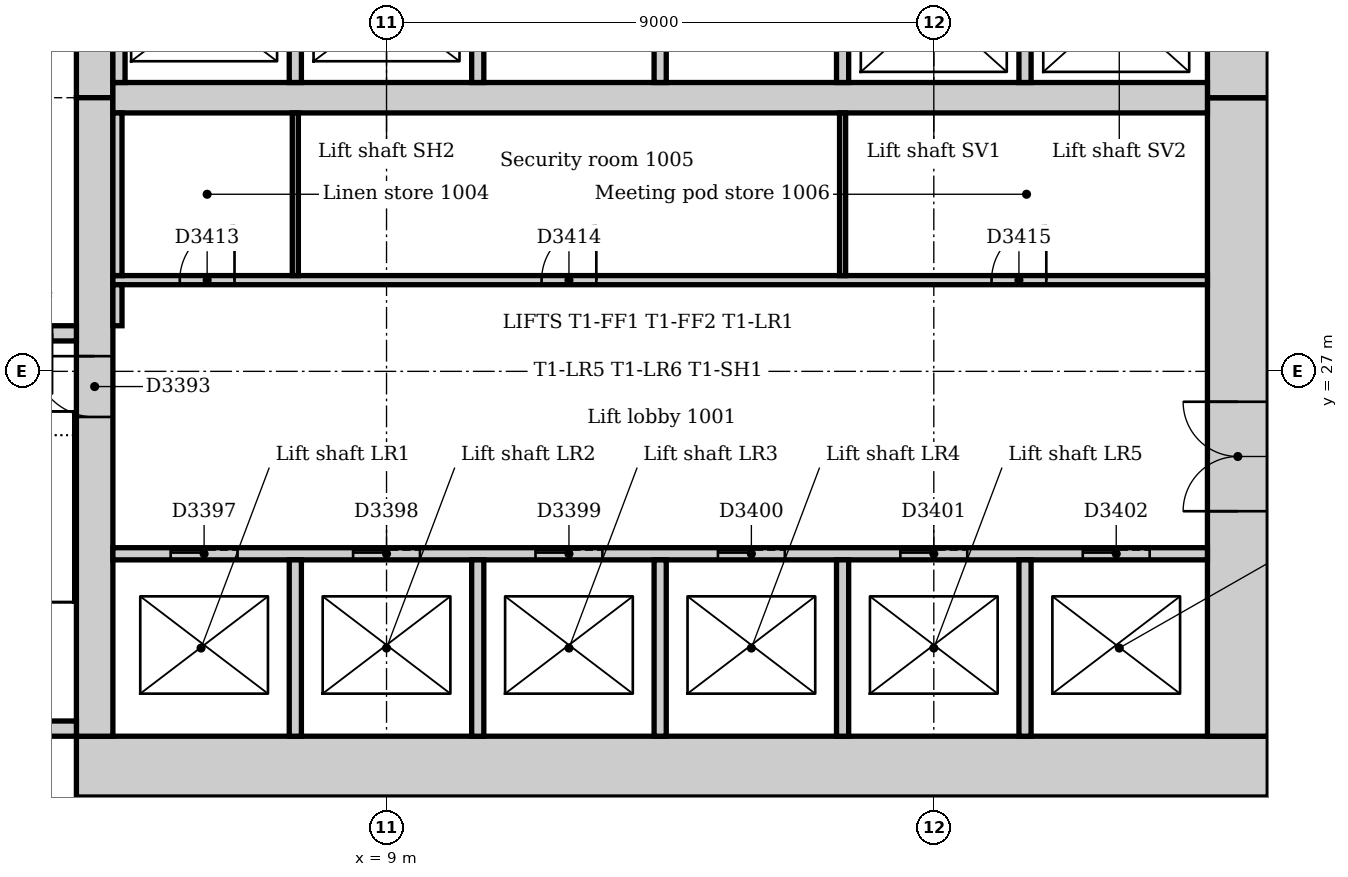
"""IFC4 building model, lengths in metres.
Left out: names, types, materials, properties, quantities, classifications, styles, units other than length and angle.
Written with IfcOpenShell. Run it as: python <this file> out.ifc"""

import sys

from ifc_helpers import new_model, si_unit, direction, frame, frame_2d, origin, place, context, subcontext, project, spatial, rectangle, extrude, element, fill, save


model = new_model("IFC4")
c1 = context("Model", 3, precision=1e-05, world=origin(), true_north=direction((0.0, 1.0)))
c2 = subcontext(c1, "Body", "Model", "MODEL_VIEW")
j1 = project(units=[si_unit("LENGTHUNIT", "METRE"), si_unit("PLANEANGLEUNIT", "RADIAN")], contexts=[c1])
p1 = place(None, origin())
s1 = spatial("IfcSite", under=j1, at=p1, CompositionType="ELEMENT")
p2 = place(p1, origin())
s2 = spatial("IfcBuilding", under=s1, at=p2, CompositionType="ELEMENT")
p3 = place(p2, frame((0.0, 0.0, 46.0)))
s3 = spatial("IfcBuildingStorey", under=s2, at=p3, CompositionType="ELEMENT", Elevation=46.0)
p4 = place(p3, frame((3.9, 20.5, 0.0), z_axis=(0.0, 0.0, 1.0), x_axis=(1.0, 0.0, 0.0)))
e1 = element("IfcWall", 1, at=p4, inside=s3, PredefinedType="SOLIDWALL", context=c2, shape_type="SweptSolid", body=[
    extrude(rectangle(XDim=19.6, YDim=1.0, at=frame_2d((9.8, 0.0))), origin(), (0.0, 0.0, 1.0), 5.0),
])
p5 = place(p3, frame((23.0, 21.0, 0.0), z_axis=(0.0, 0.0, 1.0), x_axis=(0.0, 1.0, 0.0)))
e2 = element("IfcWall", 2, at=p5, inside=s3, PredefinedType="SOLIDWALL", context=c2, shape_type="SweptSolid", body=[
    extrude(rectangle(XDim=10.5, YDim=1.0, at=frame_2d((5.25, 0.0))), origin(), (0.0, 0.0, 1.0), 5.0),
])
p6 = place(p5, frame((3.7, 0.0, 0.0)))
e3 = element("IfcOpeningElement", 3, at=p6, cuts=e2, PredefinedType="OPENING", context=c2, shape_type="SweptSolid", body=[
    extrude(rectangle(XDim=1.8, YDim=2.1, at=frame_2d((0.9, 1.05))), frame((0.0, 0.51, 0.0), z_axis=(0.0, -1.0, 0.0), x_axis=(1.0, 0.0, 0.0)), (0.0, 0.0, 1.0), 1.02),
])
p7 = place(p3, frame((23.0, 31.5, 0.0), z_axis=(0.0, 0.0, 1.0), x_axis=(0.0, 1.0, 0.0)))
e4 = element("IfcWall", 4, at=p7, inside=s3, PredefinedType="SOLIDWALL", context=c2, shape_type="SweptSolid", body=[
    extrude(rectangle(XDim=10.5, YDim=1.0, at=frame_2d((5.25, 0.0))), origin(), (0.0, 0.0, 1.0), 5.0),
])
p8 = place(p7, frame((3.15, 0.0, 0.0)))
e5 = element("IfcOpeningElement", 5, at=p8, cuts=e4, PredefinedType="OPENING", context=c2, shape_type="SweptSolid", body=[
    extrude(rectangle(XDim=1.0, YDim=2.1, at=frame_2d((0.5, 1.05))), frame((0.0, 0.51, 0.0), z_axis=(0.0, -1.0, 0.0), x_axis=(1.0, 0.0, 0.0)), (0.0, 0.0, 1.0), 1.02),
])
p9 = place(p7, frame((5.2, 0.0, 0.0)))
e6 = element("IfcOpeningElement", 6, at=p9, cuts=e4, PredefinedType="OPENING", context=c2, shape_type="SweptSolid", body=[
    extrude(rectangle(XDim=1.0, YDim=2.1, at=frame_2d((0.5, 1.05))), frame((0.0, 0.51, 0.0), z_axis=(0.0, -1.0, 0.0), x_axis=(1.0, 0.0, 0.0)), (0.0, 0.0, 1.0), 1.02),
])
p10 = place(p3, frame((4.2, 42.0, 0.0), z_axis=(0.0, 0.0, 1.0), x_axis=(0.0, -1.0, 0.0)))
e7 = element("IfcWall", 7, at=p10, inside=s3, PredefinedType="SOLIDWALL", context=c2, shape_type="SweptSolid", body=[
    extrude(rectangle(XDim=10.5, YDim=0.6, at=frame_2d((5.25, 0.0))), origin(), (0.0, 0.0, 1.0), 5.0),
])
p11 = place(p10, frame((5.3, 0.0, 0.0)))
e8 = element("IfcOpeningElement", 8, at=p11, cuts=e7, PredefinedType="OPENING", context=c2, shape_type="SweptSolid", body=[
    extrude(rectangle(XDim=1.0, YDim=2.1, at=frame_2d((0.5, 1.05))), frame((0.0, 0.31, 0.0), z_axis=(0.0, -1.0, 0.0), x_axis=(1.0, 0.0, 0.0)), (0.0, 0.0, 1.0), 0.62),
])
p12 = place(p3, frame((4.2, 31.5, 0.0), z_axis=(0.0, 0.0, 1.0), x_axis=(0.0, -1.0, 0.0)))
e9 = element("IfcWall", 9, at=p12, inside=s3, PredefinedType="SOLIDWALL", context=c2, shape_type="SweptSolid", body=[
    extrude(rectangle(XDim=10.5, YDim=0.6, at=frame_2d((5.25, 0.0))), origin(), (0.0, 0.0, 1.0), 5.0),
])
p13 = place(p12, frame((4.25, 0.0, 0.0)))
e10 = element("IfcOpeningElement", 10, at=p13, cuts=e9, PredefinedType="OPENING", context=c2, shape_type="SweptSolid", body=[
    extrude(rectangle(XDim=1.0, YDim=2.1, at=frame_2d((0.5, 1.05))), frame((0.0, 0.31, 0.0), z_axis=(0.0, -1.0, 0.0), x_axis=(1.0, 0.0, 0.0)), (0.0, 0.0, 1.0), 0.62),
])
p14 = place(p3, frame((4.5, 31.5, 0.0), z_axis=(0.0, 0.0, 1.0), x_axis=(1.0, 0.0, 0.0)))
e11 = element("IfcWall", 11, at=p14, inside=s3, PredefinedType="SOLIDWALL", context=c2, shape_type="SweptSolid", body=[
    extrude(rectangle(XDim=18.0, YDim=0.5, at=frame_2d((9.0, 0.0))), origin(), (0.0, 0.0, 1.0), 5.0),
])
p15 = place(p3, frame((0.36, 21.125, 0.0), z_axis=(0.0, 0.0, 1.0), x_axis=(1.0, 0.0, 0.0)))
e12 = element("IfcWall", 12, at=p15, inside=s3, PredefinedType="SOLIDWALL", context=c2, shape_type="SweptSolid", body=[
    extrude(rectangle(XDim=3.54, YDim=0.25, at=frame_2d((1.77, 0.0))), origin(), (0.0, 0.0, 1.0), 5.0),
])
p16 = place(p3, frame((3.9, 27.625, 0.0), z_axis=(0.0, 0.0, 1.0), x_axis=(-1.0, 0.0, 0.0)))
e13 = element("IfcWall", 13, at=p16, inside=s3, PredefinedType="SOLIDWALL", context=c2, shape_type="SweptSolid", body=[
    extrude(rectangle(XDim=3.54, YDim=0.25, at=frame_2d((1.77, 0.0))), origin(), (0.0, 0.0, 1.0), 5.0),
])
p17 = place(p16, frame((0.4, 0.0, 0.0)))
e14 = element("IfcOpeningElement", 14, at=p17, cuts=e13, PredefinedType="OPENING", context=c2, shape_type="SweptSolid", body=[
    extrude(rectangle(XDim=1.0, YDim=2.1, at=frame_2d((0.5, 1.05))), frame((0.0, 0.135, 0.0), z_axis=(0.0, -1.0, 0.0), x_axis=(1.0, 0.0, 0.0)), (0.0, 0.0, 1.0), 0.27),
])
p18 = place(p3, frame((4.5, 24.0, 0.0), z_axis=(0.0, 0.0, 1.0), x_axis=(1.0, 0.0, 0.0)))
e15 = element("IfcWall", 15, at=p18, inside=s3, PredefinedType="PARTITIONING", context=c2, shape_type="SweptSolid", body=[
    extrude(rectangle(XDim=18.0, YDim=0.2, at=frame_2d((9.0, 0.0))), origin(), (0.0, 0.0, 1.0), 4.85),
])
p19 = place(p18, frame((0.95, 0.0, 0.0)))
e16 = element("IfcOpeningElement", 16, at=p19, cuts=e15, PredefinedType="OPENING", context=c2, shape_type="SweptSolid", body=[
    extrude(rectangle(XDim=1.1, YDim=2.1, at=frame_2d((0.55, 1.05))), frame((0.0, 0.11, 0.0), z_axis=(0.0, -1.0, 0.0), x_axis=(1.0, 0.0, 0.0)), (0.0, 0.0, 1.0), 0.22),
])
p20 = place(p18, frame((3.95, 0.0, 0.0)))
e17 = element("IfcOpeningElement", 17, at=p20, cuts=e15, PredefinedType="OPENING", context=c2, shape_type="SweptSolid", body=[
    extrude(rectangle(XDim=1.1, YDim=2.1, at=frame_2d((0.55, 1.05))), frame((0.0, 0.11, 0.0), z_axis=(0.0, -1.0, 0.0), x_axis=(1.0, 0.0, 0.0)), (0.0, 0.0, 1.0), 0.22),
])
p21 = place(p18, frame((6.95, 0.0, 0.0)))
e18 = element("IfcOpeningElement", 18, at=p21, cuts=e15, PredefinedType="OPENING", context=c2, shape_type="SweptSolid", body=[
    extrude(rectangle(XDim=1.1, YDim=2.1, at=frame_2d((0.55, 1.05))), frame((0.0, 0.11, 0.0), z_axis=(0.0, -1.0, 0.0), x_axis=(1.0, 0.0, 0.0)), (0.0, 0.0, 1.0), 0.22),
])
p22 = place(p18, frame((9.95, 0.0, 0.0)))
e19 = element("IfcOpeningElement", 19, at=p22, cuts=e15, PredefinedType="OPENING", context=c2, shape_type="SweptSolid", body=[
    extrude(rectangle(XDim=1.1, YDim=2.1, at=frame_2d((0.55, 1.05))), frame((0.0, 0.11, 0.0), z_axis=(0.0, -1.0, 0.0), x_axis=(1.0, 0.0, 0.0)), (0.0, 0.0, 1.0), 0.22),
])
p23 = place(p18, frame((12.95, 0.0, 0.0)))
e20 = element("IfcOpeningElement", 20, at=p23, cuts=e15, PredefinedType="OPENING", context=c2, shape_type="SweptSolid", body=[
    extrude(rectangle(XDim=1.1, YDim=2.1, at=frame_2d((0.55, 1.05))), frame((0.0, 0.11, 0.0), z_axis=(0.0, -1.0, 0.0), x_axis=(1.0, 0.0, 0.0)), (0.0, 0.0, 1.0), 0.22),
])
p24 = place(p18, frame((15.95, 0.0, 0.0)))
e21 = element("IfcOpeningElement", 21, at=p24, cuts=e15, PredefinedType="OPENING", context=c2, shape_type="SweptSolid", body=[
    extrude(rectangle(XDim=1.1, YDim=2.1, at=frame_2d((0.55, 1.05))), frame((0.0, 0.11, 0.0), z_axis=(0.0, -1.0, 0.0), x_axis=(1.0, 0.0, 0.0)), (0.0, 0.0, 1.0), 0.22),
])
p25 = place(p3, frame((4.6, 31.75, 0.0), z_axis=(0.0, 0.0, 1.0), x_axis=(0.0, 1.0, 0.0)))
e22 = element("IfcWall", 22, at=p25, inside=s3, PredefinedType="PARTITIONING", context=c2, shape_type="SweptSolid", body=[
    extrude(rectangle(XDim=2.65, YDim=0.2, at=frame_2d((1.325, 0.0))), origin(), (0.0, 0.0, 1.0), 4.85),
])
p26 = place(p3, frame((7.5, 21.0, 0.0), z_axis=(0.0, 0.0, 1.0), x_axis=(0.0, 1.0, 0.0)))
e23 = element("IfcWall", 23, at=p26, inside=s3, PredefinedType="PARTITIONING", context=c2, shape_type="SweptSolid", body=[
    extrude(rectangle(XDim=2.9, YDim=0.2, at=frame_2d((1.45, 0.0))), origin(), (0.0, 0.0, 1.0), 4.85),
])
p27 = place(p3, frame((7.5, 31.75, 0.0), z_axis=(0.0, 0.0, 1.0), x_axis=(0.0, 1.0, 0.0)))
e24 = element("IfcWall", 24, at=p27, inside=s3, PredefinedType="PARTITIONING", context=c2, shape_type="SweptSolid", body=[
    extrude(rectangle(XDim=2.65, YDim=0.2, at=frame_2d((1.325, 0.0))), origin(), (0.0, 0.0, 1.0), 4.85),
])
p28 = place(p3, frame((10.5, 21.0, 0.0), z_axis=(0.0, 0.0, 1.0), x_axis=(0.0, 1.0, 0.0)))
e25 = element("IfcWall", 25, at=p28, inside=s3, PredefinedType="PARTITIONING", context=c2, shape_type="SweptSolid", body=[
    extrude(rectangle(XDim=2.9, YDim=0.2, at=frame_2d((1.45, 0.0))), origin(), (0.0, 0.0, 1.0), 4.85),
])
p29 = place(p3, frame((10.5, 31.75, 0.0), z_axis=(0.0, 0.0, 1.0), x_axis=(0.0, 1.0, 0.0)))
e26 = element("IfcWall", 26, at=p29, inside=s3, PredefinedType="PARTITIONING", context=c2, shape_type="SweptSolid", body=[
    extrude(rectangle(XDim=2.65, YDim=0.2, at=frame_2d((1.325, 0.0))), origin(), (0.0, 0.0, 1.0), 4.85),
])
p30 = place(p3, frame((13.5, 21.0, 0.0), z_axis=(0.0, 0.0, 1.0), x_axis=(0.0, 1.0, 0.0)))
e27 = element("IfcWall", 27, at=p30, inside=s3, PredefinedType="PARTITIONING", context=c2, shape_type="SweptSolid", body=[
    extrude(rectangle(XDim=2.9, YDim=0.2, at=frame_2d((1.45, 0.0))), origin(), (0.0, 0.0, 1.0), 4.85),
])
p31 = place(p3, frame((13.5, 31.75, 0.0), z_axis=(0.0, 0.0, 1.0), x_axis=(0.0, 1.0, 0.0)))
e28 = element("IfcWall", 28, at=p31, inside=s3, PredefinedType="PARTITIONING", context=c2, shape_type="SweptSolid", body=[
    extrude(rectangle(XDim=2.65, YDim=0.2, at=frame_2d((1.325, 0.0))), origin(), (0.0, 0.0, 1.0), 4.85),
])
p32 = place(p3, frame((16.5, 21.0, 0.0), z_axis=(0.0, 0.0, 1.0), x_axis=(0.0, 1.0, 0.0)))
e29 = element("IfcWall", 29, at=p32, inside=s3, PredefinedType="PARTITIONING", context=c2, shape_type="SweptSolid", body=[
    extrude(rectangle(XDim=2.9, YDim=0.2, at=frame_2d((1.45, 0.0))), origin(), (0.0, 0.0, 1.0), 4.85),
])
p33 = place(p3, frame((16.5, 31.75, 0.0), z_axis=(0.0, 0.0, 1.0), x_axis=(0.0, 1.0, 0.0)))
e30 = element("IfcWall", 30, at=p33, inside=s3, PredefinedType="PARTITIONING", context=c2, shape_type="SweptSolid", body=[
    extrude(rectangle(XDim=2.65, YDim=0.2, at=frame_2d((1.325, 0.0))), origin(), (0.0, 0.0, 1.0), 4.85),
])
p34 = place(p3, frame((19.5, 21.0, 0.0), z_axis=(0.0, 0.0, 1.0), x_axis=(0.0, 1.0, 0.0)))
e31 = element("IfcWall", 31, at=p34, inside=s3, PredefinedType="PARTITIONING", context=c2, shape_type="SweptSolid", body=[
    extrude(rectangle(XDim=2.9, YDim=0.2, at=frame_2d((1.45, 0.0))), origin(), (0.0, 0.0, 1.0), 4.85),
])
p35 = place(p3, frame((19.5, 31.75, 0.0), z_axis=(0.0, 0.0, 1.0), x_axis=(0.0, 1.0, 0.0)))
e32 = element("IfcWall", 32, at=p35, inside=s3, PredefinedType="PARTITIONING", context=c2, shape_type="SweptSolid", body=[
    extrude(rectangle(XDim=2.65, YDim=0.2, at=frame_2d((1.325, 0.0))), origin(), (0.0, 0.0, 1.0), 4.85),
])
p36 = place(p3, frame((4.5, 28.5, 0.0), z_axis=(0.0, 0.0, 1.0), x_axis=(1.0, 0.0, 0.0)))
e33 = element("IfcWall", 33, at=p36, inside=s3, PredefinedType="PARTITIONING", context=c2, shape_type="SweptSolid", body=[
    extrude(rectangle(XDim=18.0, YDim=0.15, at=frame_2d((9.0, 0.0))), origin(), (0.0, 0.0, 1.0), 4.85),
])
p37 = place(p36, frame((1.1, 0.0, 0.0)))
e34 = element("IfcOpeningElement", 34, at=p37, cuts=e33, PredefinedType="OPENING", context=c2, shape_type="SweptSolid", body=[
    extrude(rectangle(XDim=0.9, YDim=2.1, at=frame_2d((0.45, 1.05))), frame((0.0, 0.085, 0.0), z_axis=(0.0, -1.0, 0.0), x_axis=(1.0, 0.0, 0.0)), (0.0, 0.0, 1.0), 0.17),
])
p38 = place(p36, frame((7.05, 0.0, 0.0)))
e35 = element("IfcOpeningElement", 35, at=p38, cuts=e33, PredefinedType="OPENING", context=c2, shape_type="SweptSolid", body=[
    extrude(rectangle(XDim=0.9, YDim=2.1, at=frame_2d((0.45, 1.05))), frame((0.0, 0.085, 0.0), z_axis=(0.0, -1.0, 0.0), x_axis=(1.0, 0.0, 0.0)), (0.0, 0.0, 1.0), 0.17),
])
p39 = place(p36, frame((14.45, 0.0, 0.0)))
e36 = element("IfcOpeningElement", 36, at=p39, cuts=e33, PredefinedType="OPENING", context=c2, shape_type="SweptSolid", body=[
    extrude(rectangle(XDim=0.9, YDim=2.1, at=frame_2d((0.45, 1.05))), frame((0.0, 0.085, 0.0), z_axis=(0.0, -1.0, 0.0), x_axis=(1.0, 0.0, 0.0)), (0.0, 0.0, 1.0), 0.17),
])
p40 = place(p3, frame((4.575, 27.75, 0.0), z_axis=(0.0, 0.0, 1.0), x_axis=(0.0, 1.0, 0.0)))
e37 = element("IfcWall", 37, at=p40, inside=s3, PredefinedType="PARTITIONING", context=c2, shape_type="SweptSolid", body=[
    extrude(rectangle(XDim=0.675, YDim=0.15, at=frame_2d((0.338, 0.0))), origin(), (0.0, 0.0, 1.0), 4.85),
])
p41 = place(p3, frame((4.575, 28.575, 0.0), z_axis=(0.0, 0.0, 1.0), x_axis=(0.0, 1.0, 0.0)))
e38 = element("IfcWall", 38, at=p41, inside=s3, PredefinedType="PARTITIONING", context=c2, shape_type="SweptSolid", body=[
    extrude(rectangle(XDim=2.675, YDim=0.15, at=frame_2d((1.337, 0.0))), origin(), (0.0, 0.0, 1.0), 4.85),
])
for number, where, z_axis, x_axis in (
    (39, (7.5, 28.575, 0.0), (0.0, 0.0, 1.0), (0.0, 1.0, 0.0)),
    (40, (16.5, 28.575, 0.0), (0.0, 0.0, 1.0), (0.0, 1.0, 0.0)),
):
    element("IfcWall", number, at=place(p3, frame(where, z_axis=z_axis, x_axis=x_axis)), inside=s3, PredefinedType="PARTITIONING", context=c2, shape_type="SweptSolid", body=[
        extrude(rectangle(XDim=2.675, YDim=0.1, at=frame_2d((1.337, 0.0))), origin(), (0.0, 0.0, 1.0), 4.85),
    ])
p42 = place(p13, frame((1.0, 0.0, 0.0), z_axis=(0.0, 0.0, 1.0), x_axis=(-1.0, 0.0, 0.0)))
e41 = element("IfcDoor", 41, at=p42, inside=s3, OperationType="SINGLE_SWING_RIGHT", PredefinedType="DOOR", context=c2, shape_type="SweptSolid", body=[
    extrude(rectangle(XDim=1.0, YDim=2.1, at=frame_2d((0.5, 1.05))), frame((0.0, 0.025, 0.0), z_axis=(0.0, -1.0, 0.0), x_axis=(1.0, 0.0, 0.0)), (0.0, 0.0, 1.0), 0.05),
])
fill(e10, e41)
p43 = place(p19, origin())
e42 = element("IfcDoor", 42, at=p43, inside=s3, OperationType="SLIDING_TO_LEFT", PredefinedType="DOOR", context=c2, shape_type="SweptSolid", body=[
    extrude(rectangle(XDim=1.1, YDim=2.1, at=frame_2d((0.55, 1.05))), frame((0.0, 0.025, 0.0), z_axis=(0.0, -1.0, 0.0), x_axis=(1.0, 0.0, 0.0)), (0.0, 0.0, 1.0), 0.05),
])
fill(e16, e42)
p44 = place(p20, origin())
e43 = element("IfcDoor", 43, at=p44, inside=s3, OperationType="SLIDING_TO_LEFT", PredefinedType="DOOR", context=c2, shape_type="SweptSolid", body=[
    extrude(rectangle(XDim=1.1, YDim=2.1, at=frame_2d((0.55, 1.05))), frame((0.0, 0.025, 0.0), z_axis=(0.0, -1.0, 0.0), x_axis=(1.0, 0.0, 0.0)), (0.0, 0.0, 1.0), 0.05),
])
fill(e17, e43)
p45 = place(p21, origin())
e44 = element("IfcDoor", 44, at=p45, inside=s3, OperationType="SLIDING_TO_LEFT", PredefinedType="DOOR", context=c2, shape_type="SweptSolid", body=[
    extrude(rectangle(XDim=1.1, YDim=2.1, at=frame_2d((0.55, 1.05))), frame((0.0, 0.025, 0.0), z_axis=(0.0, -1.0, 0.0), x_axis=(1.0, 0.0, 0.0)), (0.0, 0.0, 1.0), 0.05),
])
fill(e18, e44)
p46 = place(p22, origin())
e45 = element("IfcDoor", 45, at=p46, inside=s3, OperationType="SLIDING_TO_LEFT", PredefinedType="DOOR", context=c2, shape_type="SweptSolid", body=[
    extrude(rectangle(XDim=1.1, YDim=2.1, at=frame_2d((0.55, 1.05))), frame((0.0, 0.025, 0.0), z_axis=(0.0, -1.0, 0.0), x_axis=(1.0, 0.0, 0.0)), (0.0, 0.0, 1.0), 0.05),
])
fill(e19, e45)
p47 = place(p23, origin())
e46 = element("IfcDoor", 46, at=p47, inside=s3, OperationType="SLIDING_TO_LEFT", PredefinedType="DOOR", context=c2, shape_type="SweptSolid", body=[
    extrude(rectangle(XDim=1.1, YDim=2.1, at=frame_2d((0.55, 1.05))), frame((0.0, 0.025, 0.0), z_axis=(0.0, -1.0, 0.0), x_axis=(1.0, 0.0, 0.0)), (0.0, 0.0, 1.0), 0.05),
])
fill(e20, e46)
p48 = place(p24, origin())
e47 = element("IfcDoor", 47, at=p48, inside=s3, OperationType="SLIDING_TO_LEFT", PredefinedType="DOOR", context=c2, shape_type="SweptSolid", body=[
    extrude(rectangle(XDim=1.1, YDim=2.1, at=frame_2d((0.55, 1.05))), frame((0.0, 0.025, 0.0), z_axis=(0.0, -1.0, 0.0), x_axis=(1.0, 0.0, 0.0)), (0.0, 0.0, 1.0), 0.05),
])
fill(e21, e47)
p49 = place(p6, origin())
e48 = element("IfcDoor", 48, at=p49, inside=s3, OperationType="DOUBLE_DOOR_DOUBLE_SWING", PredefinedType="DOOR", context=c2, shape_type="SweptSolid", body=[
    extrude(rectangle(XDim=1.8, YDim=2.1, at=frame_2d((0.9, 1.05))), frame((0.0, 0.025, 0.0), z_axis=(0.0, -1.0, 0.0), x_axis=(1.0, 0.0, 0.0)), (0.0, 0.0, 1.0), 0.05),
])
fill(e3, e48)
p50 = place(p37, origin())
e49 = element("IfcDoor", 49, at=p50, inside=s3, OperationType="SINGLE_SWING_RIGHT", PredefinedType="DOOR", context=c2, shape_type="SweptSolid", body=[
    extrude(rectangle(XDim=0.9, YDim=2.1, at=frame_2d((0.45, 1.05))), frame((0.0, 0.025, 0.0), z_axis=(0.0, -1.0, 0.0), x_axis=(1.0, 0.0, 0.0)), (0.0, 0.0, 1.0), 0.05),
])
fill(e34, e49)
p51 = place(p38, origin())
e50 = element("IfcDoor", 50, at=p51, inside=s3, OperationType="SINGLE_SWING_RIGHT", PredefinedType="DOOR", context=c2, shape_type="SweptSolid", body=[
    extrude(rectangle(XDim=0.9, YDim=2.1, at=frame_2d((0.45, 1.05))), frame((0.0, 0.025, 0.0), z_axis=(0.0, -1.0, 0.0), x_axis=(1.0, 0.0, 0.0)), (0.0, 0.0, 1.0), 0.05),
])
fill(e35, e50)
p52 = place(p39, origin())
e51 = element("IfcDoor", 51, at=p52, inside=s3, OperationType="SINGLE_SWING_RIGHT", PredefinedType="DOOR", context=c2, shape_type="SweptSolid", body=[
    extrude(rectangle(XDim=0.9, YDim=2.1, at=frame_2d((0.45, 1.05))), frame((0.0, 0.025, 0.0), z_axis=(0.0, -1.0, 0.0), x_axis=(1.0, 0.0, 0.0)), (0.0, 0.0, 1.0), 0.05),
])
fill(e36, e51)
save(model, sys.argv[1])
